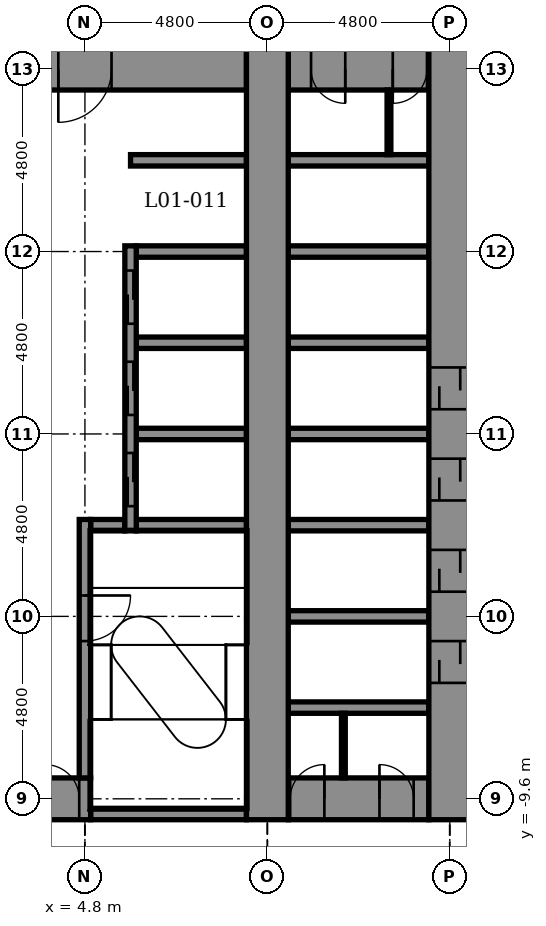
"""IFC4 building model, lengths in metres.
Left out: names, types, materials, properties, quantities, classifications, styles, units other than length and angle.
Written with IfcOpenShell. Run it as: python <this file> out.ifc"""

import sys

from ifc_helpers import new_model, si_unit, direction, frame, frame_2d, origin, place, context, subcontext, project, spatial, rectangle, extrude, element, fill, save


model = new_model("IFC4")
c1 = context("Model", 3, precision=1e-05, world=origin(), true_north=direction((0.0, 1.0)))
c2 = subcontext(c1, "Body", "Model", "MODEL_VIEW")
j1 = project(units=[si_unit("LENGTHUNIT", "METRE"), si_unit("PLANEANGLEUNIT", "RADIAN")], contexts=[c1])
p1 = place(None, origin())
s1 = spatial("IfcSite", under=j1, at=p1, CompositionType="ELEMENT")
p2 = place(p1, origin())
s2 = spatial("IfcBuilding", under=s1, at=p2, CompositionType="ELEMENT")
p3 = place(p2, frame((0.0, 0.0, 7.0)))
s3 = spatial("IfcBuildingStorey", under=s2, at=p3, CompositionType="ELEMENT", Elevation=7.0)
p4 = place(p3, frame((4.95, -10.0, -0.3), z_axis=(0.0, 0.0, 1.0), x_axis=(1.0, 0.0, 0.0)))
e1 = element("IfcWall", 1, at=p4, inside=s3, PredefinedType="STANDARD", context=c2, shape_type="SweptSolid", body=[
    extrude(rectangle(XDim=4.1, YDim=0.3, at=frame_2d((2.05, 0.0))), origin(), (0.0, 0.0, 1.0), 5.4),
])
p5 = place(p3, frame((-5.25, -9.6, -0.3), z_axis=(0.0, 0.0, 1.0), x_axis=(1.0, 0.0, 0.0)))
e2 = element("IfcWall", 2, at=p5, inside=s3, PredefinedType="SHEAR", context=c2, shape_type="SweptSolid", body=[
    extrude(rectangle(XDim=10.2, YDim=1.1, at=frame_2d((5.1, 0.0))), origin(), (0.0, 0.0, 1.0), 5.4),
])
p6 = place(p5, frame((9.0, 0.0, 0.3)))
e3 = element("IfcOpeningElement", 3, at=p6, cuts=e2, PredefinedType="OPENING", context=c2, shape_type="SweptSolid", body=[
    extrude(rectangle(XDim=0.9, YDim=2.1, at=frame_2d((0.45, 1.05))), frame((0.0, 0.56, 0.0), z_axis=(0.0, -1.0, 0.0), x_axis=(1.0, 0.0, 0.0)), (0.0, 0.0, 1.0), 1.12),
])
p7 = place(p3, frame((10.15, -9.6, -0.3), z_axis=(0.0, 0.0, 1.0), x_axis=(1.0, 0.0, 0.0)))
e4 = element("IfcWall", 4, at=p7, inside=s3, PredefinedType="SHEAR", context=c2, shape_type="SweptSolid", body=[
    extrude(rectangle(XDim=3.7, YDim=1.1, at=frame_2d((1.85, 0.0))), origin(), (0.0, 0.0, 1.0), 5.4),
])
p8 = place(p7, frame((0.05, 0.0, 0.3)))
e5 = element("IfcOpeningElement", 5, at=p8, cuts=e4, PredefinedType="OPENING", context=c2, shape_type="SweptSolid", body=[
    extrude(rectangle(XDim=0.9, YDim=2.1, at=frame_2d((0.45, 1.05))), frame((0.0, 0.56, 0.0), z_axis=(0.0, -1.0, 0.0), x_axis=(1.0, 0.0, 0.0)), (0.0, 0.0, 1.0), 1.12),
])
p9 = place(p7, frame((2.4, 0.0, 0.3)))
e6 = element("IfcOpeningElement", 6, at=p9, cuts=e4, PredefinedType="OPENING", context=c2, shape_type="SweptSolid", body=[
    extrude(rectangle(XDim=0.9, YDim=2.1, at=frame_2d((0.45, 1.05))), frame((0.0, 0.56, 0.0), z_axis=(0.0, -1.0, 0.0), x_axis=(1.0, 0.0, 0.0)), (0.0, 0.0, 1.0), 1.12),
])
for number, where, z_axis, x_axis in (
    (7, (10.15, -7.2, -0.3), (0.0, 0.0, 1.0), (1.0, 0.0, 0.0)),
    (8, (10.15, -4.8, -0.3), (0.0, 0.0, 1.0), (1.0, 0.0, 0.0)),
):
    element("IfcWall", number, at=place(p3, frame(where, z_axis=z_axis, x_axis=x_axis)), inside=s3, PredefinedType="STANDARD", context=c2, shape_type="SweptSolid", body=[
        extrude(rectangle(XDim=3.7, YDim=0.3, at=frame_2d((1.85, 0.0))), origin(), (0.0, 0.0, 1.0), 5.4),
    ])
p10 = place(p3, frame((4.95, -2.4, -0.3), z_axis=(0.0, 0.0, 1.0), x_axis=(1.0, 0.0, 0.0)))
e9 = element("IfcWall", 9, at=p10, inside=s3, PredefinedType="STANDARD", context=c2, shape_type="SweptSolid", body=[
    extrude(rectangle(XDim=0.9, YDim=0.3, at=frame_2d((0.45, 0.0))), origin(), (0.0, 0.0, 1.0), 5.4),
])
p11 = place(p3, frame((6.15, -2.4, -0.3), z_axis=(0.0, 0.0, 1.0), x_axis=(1.0, 0.0, 0.0)))
e10 = element("IfcWall", 10, at=p11, inside=s3, PredefinedType="STANDARD", context=c2, shape_type="SweptSolid", body=[
    extrude(rectangle(XDim=2.9, YDim=0.3, at=frame_2d((1.45, 0.0))), origin(), (0.0, 0.0, 1.0), 5.4),
])
p12 = place(p3, frame((10.15, -2.4, -0.3), z_axis=(0.0, 0.0, 1.0), x_axis=(1.0, 0.0, 0.0)))
e11 = element("IfcWall", 11, at=p12, inside=s3, PredefinedType="STANDARD", context=c2, shape_type="SweptSolid", body=[
    extrude(rectangle(XDim=3.7, YDim=0.3, at=frame_2d((1.85, 0.0))), origin(), (0.0, 0.0, 1.0), 5.4),
])
p13 = place(p3, frame((6.15, 0.0, -0.3), z_axis=(0.0, 0.0, 1.0), x_axis=(1.0, 0.0, 0.0)))
e12 = element("IfcWall", 12, at=p13, inside=s3, PredefinedType="STANDARD", context=c2, shape_type="SweptSolid", body=[
    extrude(rectangle(XDim=2.9, YDim=0.3, at=frame_2d((1.45, 0.0))), origin(), (0.0, 0.0, 1.0), 5.4),
])
p14 = place(p3, frame((10.15, 0.0, -0.3), z_axis=(0.0, 0.0, 1.0), x_axis=(1.0, 0.0, 0.0)))
e13 = element("IfcWall", 13, at=p14, inside=s3, PredefinedType="STANDARD", context=c2, shape_type="SweptSolid", body=[
    extrude(rectangle(XDim=3.7, YDim=0.3, at=frame_2d((1.85, 0.0))), origin(), (0.0, 0.0, 1.0), 5.4),
])
p15 = place(p3, frame((6.15, 2.4, -0.3), z_axis=(0.0, 0.0, 1.0), x_axis=(1.0, 0.0, 0.0)))
e14 = element("IfcWall", 14, at=p15, inside=s3, PredefinedType="STANDARD", context=c2, shape_type="SweptSolid", body=[
    extrude(rectangle(XDim=2.9, YDim=0.3, at=frame_2d((1.45, 0.0))), origin(), (0.0, 0.0, 1.0), 5.4),
])
p16 = place(p3, frame((10.15, 2.4, -0.3), z_axis=(0.0, 0.0, 1.0), x_axis=(1.0, 0.0, 0.0)))
e15 = element("IfcWall", 15, at=p16, inside=s3, PredefinedType="STANDARD", context=c2, shape_type="SweptSolid", body=[
    extrude(rectangle(XDim=3.7, YDim=0.3, at=frame_2d((1.85, 0.0))), origin(), (0.0, 0.0, 1.0), 5.4),
])
p17 = place(p3, frame((6.15, 4.8, -0.3), z_axis=(0.0, 0.0, 1.0), x_axis=(1.0, 0.0, 0.0)))
e16 = element("IfcWall", 16, at=p17, inside=s3, PredefinedType="STANDARD", context=c2, shape_type="SweptSolid", body=[
    extrude(rectangle(XDim=2.9, YDim=0.3, at=frame_2d((1.45, 0.0))), origin(), (0.0, 0.0, 1.0), 5.4),
])
p18 = place(p3, frame((10.15, 4.8, -0.3), z_axis=(0.0, 0.0, 1.0), x_axis=(1.0, 0.0, 0.0)))
e17 = element("IfcWall", 17, at=p18, inside=s3, PredefinedType="STANDARD", context=c2, shape_type="SweptSolid", body=[
    extrude(rectangle(XDim=3.7, YDim=0.3, at=frame_2d((1.85, 0.0))), origin(), (0.0, 0.0, 1.0), 5.4),
])
p19 = place(p3, frame((6.0, 7.2, -0.3), z_axis=(0.0, 0.0, 1.0), x_axis=(1.0, 0.0, 0.0)))
e18 = element("IfcWall", 18, at=p19, inside=s3, PredefinedType="STANDARD", context=c2, shape_type="SweptSolid", body=[
    extrude(rectangle(XDim=3.05, YDim=0.3, at=frame_2d((1.525, 0.0))), origin(), (0.0, 0.0, 1.0), 5.4),
])
p20 = place(p3, frame((10.15, 7.2, -0.3), z_axis=(0.0, 0.0, 1.0), x_axis=(1.0, 0.0, 0.0)))
e19 = element("IfcWall", 19, at=p20, inside=s3, PredefinedType="STANDARD", context=c2, shape_type="SweptSolid", body=[
    extrude(rectangle(XDim=3.7, YDim=0.3, at=frame_2d((1.85, 0.0))), origin(), (0.0, 0.0, 1.0), 5.4),
])
p21 = place(p3, frame((-5.25, 9.6, -0.3), z_axis=(0.0, 0.0, 1.0), x_axis=(1.0, 0.0, 0.0)))
e20 = element("IfcWall", 20, at=p21, inside=s3, PredefinedType="SHEAR", context=c2, shape_type="SweptSolid", body=[
    extrude(rectangle(XDim=14.3, YDim=1.1, at=frame_2d((7.15, 0.0))), origin(), (0.0, 0.0, 1.0), 5.4),
])
p22 = place(p21, frame((9.35, 0.0, 0.3)))
e21 = element("IfcOpeningElement", 21, at=p22, cuts=e20, PredefinedType="OPENING", context=c2, shape_type="SweptSolid", body=[
    extrude(rectangle(XDim=1.4, YDim=2.1, at=frame_2d((0.7, 1.05))), frame((0.0, 0.56, 0.0), z_axis=(0.0, -1.0, 0.0), x_axis=(1.0, 0.0, 0.0)), (0.0, 0.0, 1.0), 1.12),
])
p23 = place(p3, frame((10.15, 9.6, -0.3), z_axis=(0.0, 0.0, 1.0), x_axis=(1.0, 0.0, 0.0)))
e22 = element("IfcWall", 22, at=p23, inside=s3, PredefinedType="SHEAR", context=c2, shape_type="SweptSolid", body=[
    extrude(rectangle(XDim=3.7, YDim=1.1, at=frame_2d((1.85, 0.0))), origin(), (0.0, 0.0, 1.0), 5.4),
])
p24 = place(p23, frame((0.6, 0.0, 0.3)))
e23 = element("IfcOpeningElement", 23, at=p24, cuts=e22, PredefinedType="OPENING", context=c2, shape_type="SweptSolid", body=[
    extrude(rectangle(XDim=0.9, YDim=2.1, at=frame_2d((0.45, 1.05))), frame((0.0, 0.56, 0.0), z_axis=(0.0, -1.0, 0.0), x_axis=(1.0, 0.0, 0.0)), (0.0, 0.0, 1.0), 1.12),
])
p25 = place(p23, frame((2.75, 0.0, 0.3)))
e24 = element("IfcOpeningElement", 24, at=p25, cuts=e22, PredefinedType="OPENING", context=c2, shape_type="SweptSolid", body=[
    extrude(rectangle(XDim=0.9, YDim=2.1, at=frame_2d((0.45, 1.05))), frame((0.0, 0.56, 0.0), z_axis=(0.0, -1.0, 0.0), x_axis=(1.0, 0.0, 0.0)), (0.0, 0.0, 1.0), 1.12),
])
p26 = place(p3, frame((4.8, -9.05, -0.3), z_axis=(0.0, 0.0, 1.0), x_axis=(0.0, 1.0, 0.0)))
e25 = element("IfcWall", 25, at=p26, inside=s3, PredefinedType="STANDARD", context=c2, shape_type="SweptSolid", body=[
    extrude(rectangle(XDim=6.8, YDim=0.3, at=frame_2d((3.4, 0.0))), origin(), (0.0, 0.0, 1.0), 5.4),
])
p27 = place(p26, frame((3.6, 0.0, 0.3)))
e26 = element("IfcOpeningElement", 26, at=p27, cuts=e25, PredefinedType="OPENING", context=c2, shape_type="SweptSolid", body=[
    extrude(rectangle(XDim=1.2, YDim=2.1, at=frame_2d((0.6, 1.05))), frame((0.0, 0.16, 0.0), z_axis=(0.0, -1.0, 0.0), x_axis=(1.0, 0.0, 0.0)), (0.0, 0.0, 1.0), 0.32),
])
p28 = place(p3, frame((6.0, -2.55, -0.3), z_axis=(0.0, 0.0, 1.0), x_axis=(0.0, 1.0, 0.0)))
e27 = element("IfcWall", 27, at=p28, inside=s3, PredefinedType="STANDARD", context=c2, shape_type="SweptSolid", body=[
    extrude(rectangle(XDim=7.5, YDim=0.3, at=frame_2d((3.75, 0.0))), origin(), (0.0, 0.0, 1.0), 5.4),
])
p29 = place(p28, frame((0.65, 0.0, 0.3)))
e28 = element("IfcOpeningElement", 28, at=p29, cuts=e27, PredefinedType="OPENING", context=c2, shape_type="SweptSolid", body=[
    extrude(rectangle(XDim=1.4, YDim=2.1, at=frame_2d((0.7, 1.05))), frame((0.0, 0.16, 0.0), z_axis=(0.0, -1.0, 0.0), x_axis=(1.0, 0.0, 0.0)), (0.0, 0.0, 1.0), 0.32),
])
p30 = place(p28, frame((3.05, 0.0, 0.3)))
e29 = element("IfcOpeningElement", 29, at=p30, cuts=e27, PredefinedType="OPENING", context=c2, shape_type="SweptSolid", body=[
    extrude(rectangle(XDim=1.4, YDim=2.1, at=frame_2d((0.7, 1.05))), frame((0.0, 0.16, 0.0), z_axis=(0.0, -1.0, 0.0), x_axis=(1.0, 0.0, 0.0)), (0.0, 0.0, 1.0), 0.32),
])
p31 = place(p28, frame((5.45, 0.0, 0.3)))
e30 = element("IfcOpeningElement", 30, at=p31, cuts=e27, PredefinedType="OPENING", context=c2, shape_type="SweptSolid", body=[
    extrude(rectangle(XDim=1.4, YDim=2.1, at=frame_2d((0.7, 1.05))), frame((0.0, 0.16, 0.0), z_axis=(0.0, -1.0, 0.0), x_axis=(1.0, 0.0, 0.0)), (0.0, 0.0, 1.0), 0.32),
])
p32 = place(p3, frame((9.6, -10.15, -0.3), z_axis=(0.0, 0.0, 1.0), x_axis=(0.0, 1.0, 0.0)))
e31 = element("IfcWall", 31, at=p32, inside=s3, PredefinedType="SHEAR", context=c2, shape_type="SweptSolid", body=[
    extrude(rectangle(XDim=20.3, YDim=1.1, at=frame_2d((10.15, 0.0))), origin(), (0.0, 0.0, 1.0), 5.4),
])
p33 = place(p3, frame((14.4, -10.15, -0.3), z_axis=(0.0, 0.0, 1.0), x_axis=(0.0, 1.0, 0.0)))
e32 = element("IfcWall", 32, at=p33, inside=s3, PredefinedType="SHEAR", context=c2, shape_type="SweptSolid", body=[
    extrude(rectangle(XDim=20.3, YDim=1.1, at=frame_2d((10.15, 0.0))), origin(), (0.0, 0.0, 1.0), 5.4),
])
p34 = place(p33, frame((3.6, 0.0, 0.3)))
e33 = element("IfcOpeningElement", 33, at=p34, cuts=e32, PredefinedType="OPENING", context=c2, shape_type="SweptSolid", body=[
    extrude(rectangle(XDim=1.1, YDim=2.1, at=frame_2d((0.55, 1.05))), frame((0.0, 0.56, 0.0), z_axis=(0.0, -1.0, 0.0), x_axis=(1.0, 0.0, 0.0)), (0.0, 0.0, 1.0), 1.12),
])
p35 = place(p33, frame((6.0, 0.0, 0.3)))
e34 = element("IfcOpeningElement", 34, at=p35, cuts=e32, PredefinedType="OPENING", context=c2, shape_type="SweptSolid", body=[
    extrude(rectangle(XDim=1.1, YDim=2.1, at=frame_2d((0.55, 1.05))), frame((0.0, 0.56, 0.0), z_axis=(0.0, -1.0, 0.0), x_axis=(1.0, 0.0, 0.0)), (0.0, 0.0, 1.0), 1.12),
])
p36 = place(p33, frame((8.4, 0.0, 0.3)))
e35 = element("IfcOpeningElement", 35, at=p36, cuts=e32, PredefinedType="OPENING", context=c2, shape_type="SweptSolid", body=[
    extrude(rectangle(XDim=1.1, YDim=2.1, at=frame_2d((0.55, 1.05))), frame((0.0, 0.56, 0.0), z_axis=(0.0, -1.0, 0.0), x_axis=(1.0, 0.0, 0.0)), (0.0, 0.0, 1.0), 1.12),
])
p37 = place(p33, frame((10.8, 0.0, 0.3)))
e36 = element("IfcOpeningElement", 36, at=p37, cuts=e32, PredefinedType="OPENING", context=c2, shape_type="SweptSolid", body=[
    extrude(rectangle(XDim=1.1, YDim=2.1, at=frame_2d((0.55, 1.05))), frame((0.0, 0.56, 0.0), z_axis=(0.0, -1.0, 0.0), x_axis=(1.0, 0.0, 0.0)), (0.0, 0.0, 1.0), 1.12),
])
for number, where, z_axis, x_axis in (
    (37, (12.8, 7.35, 0.0), (0.0, 0.0, 1.0), (0.0, 1.0, 0.0)),
    (38, (11.6, -9.05, 0.0), (0.0, 0.0, 1.0), (0.0, 1.0, 0.0)),
):
    element("IfcWall", number, at=place(p3, frame(where, z_axis=z_axis, x_axis=x_axis)), inside=s3, PredefinedType="PARTITIONING", context=c2, shape_type="SweptSolid", body=[
        extrude(rectangle(XDim=1.7, YDim=0.1, at=frame_2d((0.85, 0.0))), origin(), (0.0, 0.0, 1.0), 5.1),
    ])
p38 = place(p29, origin())
e39 = element("IfcDoor", 39, at=p38, inside=s3, OperationType="DOUBLE_DOOR_SLIDING", PredefinedType="DOOR", context=c2, shape_type="SweptSolid", body=[
    extrude(rectangle(XDim=1.4, YDim=2.1, at=frame_2d((0.7, 1.05))), frame((0.0, 0.025, 0.0), z_axis=(0.0, -1.0, 0.0), x_axis=(1.0, 0.0, 0.0)), (0.0, 0.0, 1.0), 0.05),
])
fill(e28, e39)
p39 = place(p30, origin())
e40 = element("IfcDoor", 40, at=p39, inside=s3, OperationType="DOUBLE_DOOR_SLIDING", PredefinedType="DOOR", context=c2, shape_type="SweptSolid", body=[
    extrude(rectangle(XDim=1.4, YDim=2.1, at=frame_2d((0.7, 1.05))), frame((0.0, 0.025, 0.0), z_axis=(0.0, -1.0, 0.0), x_axis=(1.0, 0.0, 0.0)), (0.0, 0.0, 1.0), 0.05),
])
fill(e29, e40)
p40 = place(p31, origin())
e41 = element("IfcDoor", 41, at=p40, inside=s3, OperationType="DOUBLE_DOOR_SLIDING", PredefinedType="DOOR", context=c2, shape_type="SweptSolid", body=[
    extrude(rectangle(XDim=1.4, YDim=2.1, at=frame_2d((0.7, 1.05))), frame((0.0, 0.025, 0.0), z_axis=(0.0, -1.0, 0.0), x_axis=(1.0, 0.0, 0.0)), (0.0, 0.0, 1.0), 0.05),
])
fill(e30, e41)
p41 = place(p34, origin())
e42 = element("IfcDoor", 42, at=p41, inside=s3, OperationType="DOUBLE_DOOR_SLIDING", PredefinedType="DOOR", context=c2, shape_type="SweptSolid", body=[
    extrude(rectangle(XDim=1.1, YDim=2.1, at=frame_2d((0.55, 1.05))), frame((0.0, 0.025, 0.0), z_axis=(0.0, -1.0, 0.0), x_axis=(1.0, 0.0, 0.0)), (0.0, 0.0, 1.0), 0.05),
])
fill(e33, e42)
p42 = place(p35, origin())
e43 = element("IfcDoor", 43, at=p42, inside=s3, OperationType="DOUBLE_DOOR_SLIDING", PredefinedType="DOOR", context=c2, shape_type="SweptSolid", body=[
    extrude(rectangle(XDim=1.1, YDim=2.1, at=frame_2d((0.55, 1.05))), frame((0.0, 0.025, 0.0), z_axis=(0.0, -1.0, 0.0), x_axis=(1.0, 0.0, 0.0)), (0.0, 0.0, 1.0), 0.05),
])
fill(e34, e43)
p43 = place(p36, origin())
e44 = element("IfcDoor", 44, at=p43, inside=s3, OperationType="DOUBLE_DOOR_SLIDING", PredefinedType="DOOR", context=c2, shape_type="SweptSolid", body=[
    extrude(rectangle(XDim=1.1, YDim=2.1, at=frame_2d((0.55, 1.05))), frame((0.0, 0.025, 0.0), z_axis=(0.0, -1.0, 0.0), x_axis=(1.0, 0.0, 0.0)), (0.0, 0.0, 1.0), 0.05),
])
fill(e35, e44)
p44 = place(p37, origin())
e45 = element("IfcDoor", 45, at=p44, inside=s3, OperationType="DOUBLE_DOOR_SLIDING", PredefinedType="DOOR", context=c2, shape_type="SweptSolid", body=[
    extrude(rectangle(XDim=1.1, YDim=2.1, at=frame_2d((0.55, 1.05))), frame((0.0, 0.025, 0.0), z_axis=(0.0, -1.0, 0.0), x_axis=(1.0, 0.0, 0.0)), (0.0, 0.0, 1.0), 0.05),
])
fill(e36, e45)
p45 = place(p27, frame((1.2, 0.0, 0.0), z_axis=(0.0, 0.0, 1.0), x_axis=(-1.0, 0.0, 0.0)))
e46 = element("IfcDoor", 46, at=p45, inside=s3, OperationType="SINGLE_SWING_RIGHT", PredefinedType="DOOR", context=c2, shape_type="SweptSolid", body=[
    extrude(rectangle(XDim=1.2, YDim=2.1, at=frame_2d((0.6, 1.05))), frame((0.0, 0.025, 0.0), z_axis=(0.0, -1.0, 0.0), x_axis=(1.0, 0.0, 0.0)), (0.0, 0.0, 1.0), 0.05),
])
fill(e26, e46)
p46 = place(p8, origin())
e47 = element("IfcDoor", 47, at=p46, inside=s3, OperationType="SINGLE_SWING_RIGHT", PredefinedType="DOOR", context=c2, shape_type="SweptSolid", body=[
    extrude(rectangle(XDim=0.9, YDim=2.1, at=frame_2d((0.45, 1.05))), frame((0.0, 0.025, 0.0), z_axis=(0.0, -1.0, 0.0), x_axis=(1.0, 0.0, 0.0)), (0.0, 0.0, 1.0), 0.05),
])
fill(e5, e47)
p47 = place(p9, origin())
e48 = element("IfcDoor", 48, at=p47, inside=s3, OperationType="SINGLE_SWING_LEFT", PredefinedType="DOOR", context=c2, shape_type="SweptSolid", body=[
    extrude(rectangle(XDim=0.9, YDim=2.1, at=frame_2d((0.45, 1.05))), frame((0.0, 0.025, 0.0), z_axis=(0.0, -1.0, 0.0), x_axis=(1.0, 0.0, 0.0)), (0.0, 0.0, 1.0), 0.05),
])
fill(e6, e48)
p48 = place(p24, frame((0.9, 0.0, 0.0), z_axis=(0.0, 0.0, 1.0), x_axis=(-1.0, 0.0, 0.0)))
e49 = element("IfcDoor", 49, at=p48, inside=s3, OperationType="SINGLE_SWING_RIGHT", PredefinedType="DOOR", context=c2, shape_type="SweptSolid", body=[
    extrude(rectangle(XDim=0.9, YDim=2.1, at=frame_2d((0.45, 1.05))), frame((0.0, 0.025, 0.0), z_axis=(0.0, -1.0, 0.0), x_axis=(1.0, 0.0, 0.0)), (0.0, 0.0, 1.0), 0.05),
])
fill(e23, e49)
p49 = place(p25, frame((0.9, 0.0, 0.0), z_axis=(0.0, 0.0, 1.0), x_axis=(-1.0, 0.0, 0.0)))
e50 = element("IfcDoor", 50, at=p49, inside=s3, OperationType="SINGLE_SWING_LEFT", PredefinedType="DOOR", context=c2, shape_type="SweptSolid", body=[
    extrude(rectangle(XDim=0.9, YDim=2.1, at=frame_2d((0.45, 1.05))), frame((0.0, 0.025, 0.0), z_axis=(0.0, -1.0, 0.0), x_axis=(1.0, 0.0, 0.0)), (0.0, 0.0, 1.0), 0.05),
])
fill(e24, e50)
p50 = place(p22, frame((1.4, 0.0, 0.0), z_axis=(0.0, 0.0, 1.0), x_axis=(-1.0, 0.0, 0.0)))
e51 = element("IfcDoor", 51, at=p50, inside=s3, OperationType="SINGLE_SWING_LEFT", PredefinedType="DOOR", context=c2, shape_type="SweptSolid", body=[
    extrude(rectangle(XDim=1.4, YDim=2.1, at=frame_2d((0.7, 1.05))), frame((0.0, 0.025, 0.0), z_axis=(0.0, -1.0, 0.0), x_axis=(1.0, 0.0, 0.0)), (0.0, 0.0, 1.0), 0.05),
])
fill(e21, e51)
p51 = place(p6, origin())
e52 = element("IfcDoor", 52, at=p51, inside=s3, OperationType="SINGLE_SWING_LEFT", PredefinedType="DOOR", context=c2, shape_type="SweptSolid", body=[
    extrude(rectangle(XDim=0.9, YDim=2.1, at=frame_2d((0.45, 1.05))), frame((0.0, 0.025, 0.0), z_axis=(0.0, -1.0, 0.0), x_axis=(1.0, 0.0, 0.0)), (0.0, 0.0, 1.0), 0.05),
])
fill(e3, e52)
save(model, sys.argv[1])
